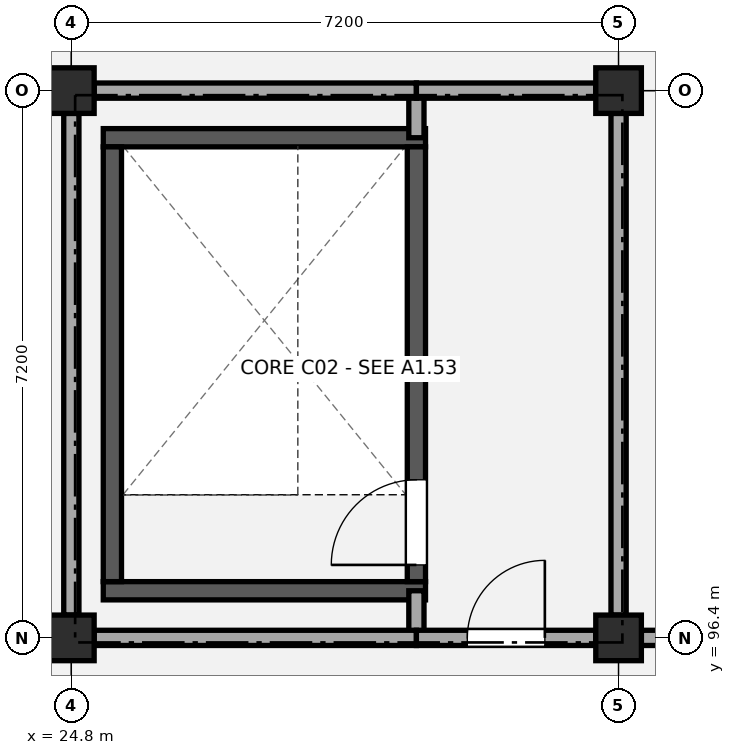
"""IFC4 building model, lengths in metres.
Left out: names, types, materials, properties, quantities, classifications, styles, units other than length and angle.
Written with IfcOpenShell. Run it as: python <this file> out.ifc"""

import sys

from ifc_helpers import new_model, si_unit, direction, frame, frame_2d, origin, origin_2d, place, context, subcontext, project, spatial, rectangle, extrude, element, fill, save


model = new_model("IFC4")
c1 = context("Model", 3, precision=1e-05, world=origin(), true_north=direction((0.0, 1.0)))
c2 = subcontext(c1, "Body", "Model", "MODEL_VIEW")
j1 = project(units=[si_unit("LENGTHUNIT", "METRE"), si_unit("PLANEANGLEUNIT", "RADIAN")], contexts=[c1])
p1 = place(None, origin())
s1 = spatial("IfcSite", under=j1, at=p1, CompositionType="ELEMENT")
p2 = place(p1, origin())
s2 = spatial("IfcBuilding", under=s1, at=p2, CompositionType="ELEMENT")
p3 = place(p2, frame((0.0, 0.0, 9.18)))
s3 = spatial("IfcBuildingStorey", under=s2, at=p3, CompositionType="ELEMENT", Elevation=9.18)
for number, where, z_axis, x_axis in (
    (1, (24.8, 96.4, 0.0), (0.0, 0.0, 1.0), (1.0, 0.0, 0.0)),
    (2, (24.8, 103.6, 0.0), (0.0, 0.0, 1.0), (1.0, 0.0, 0.0)),
    (3, (32.0, 96.4, 0.0), (0.0, 0.0, 1.0), (1.0, 0.0, 0.0)),
    (4, (32.0, 103.6, 0.0), (0.0, 0.0, 1.0), (1.0, 0.0, 0.0)),
):
    element("IfcColumn", number, at=place(p3, frame(where, z_axis=z_axis, x_axis=x_axis)), inside=s3, PredefinedType="COLUMN", context=c2, shape_type="SweptSolid", body=[
        extrude(rectangle(XDim=0.6, YDim=0.6, at=origin_2d()), origin(), (0.0, 0.0, 1.0), 4.32),
    ])
for number, where, z_axis, x_axis in (
    (5, (25.22, 97.02, 0.0), (0.0, 0.0, 1.0), (1.0, 0.0, 0.0)),
    (6, (25.22, 102.98, 0.0), (0.0, 0.0, 1.0), (1.0, 0.0, 0.0)),
):
    element("IfcWall", number, at=place(p3, frame(where, z_axis=z_axis, x_axis=x_axis)), inside=s3, PredefinedType="SHEAR", context=c2, shape_type="SweptSolid", body=[
        extrude(rectangle(XDim=4.24, YDim=0.24, at=frame_2d((2.12, 0.0))), origin(), (0.0, 0.0, 1.0), 4.04),
    ])
p4 = place(p3, frame((25.34, 97.14, 0.0), z_axis=(0.0, 0.0, 1.0), x_axis=(0.0, 1.0, 0.0)))
e7 = element("IfcWall", 7, at=p4, inside=s3, PredefinedType="SHEAR", context=c2, shape_type="SweptSolid", body=[
    extrude(rectangle(XDim=5.72, YDim=0.24, at=frame_2d((2.86, 0.0))), origin(), (0.0, 0.0, 1.0), 4.04),
])
p5 = place(p3, frame((29.34, 97.14, 0.0), z_axis=(0.0, 0.0, 1.0), x_axis=(0.0, 1.0, 0.0)))
e8 = element("IfcWall", 8, at=p5, inside=s3, PredefinedType="SHEAR", context=c2, shape_type="SweptSolid", body=[
    extrude(rectangle(XDim=5.72, YDim=0.24, at=frame_2d((2.86, 0.0))), origin(), (0.0, 0.0, 1.0), 4.04),
])
p6 = place(p5, frame((0.22, 0.0, 0.0)))
e9 = element("IfcOpeningElement", 9, at=p6, cuts=e8, PredefinedType="OPENING", context=c2, shape_type="SweptSolid", body=[
    extrude(rectangle(XDim=1.12, YDim=2.15, at=frame_2d((0.56, 1.075))), frame((0.0, 0.13, 0.0), z_axis=(0.0, -1.0, 0.0), x_axis=(1.0, 0.0, 0.0)), (0.0, 0.0, 1.0), 0.26),
])
p7 = place(p3, frame((29.34, 96.4, 0.0), z_axis=(0.0, 0.0, 1.0), x_axis=(0.0, 1.0, 0.0)))
e10 = element("IfcWall", 10, at=p7, inside=s3, PredefinedType="PARTITIONING", context=c2, shape_type="SweptSolid", body=[
    extrude(rectangle(XDim=0.62, YDim=0.2, at=frame_2d((0.31, 0.0))), origin(), (0.0, 0.0, 1.0), 3.38),
])
p8 = place(p3, frame((29.34, 102.98, 0.0), z_axis=(0.0, 0.0, 1.0), x_axis=(0.0, 1.0, 0.0)))
e11 = element("IfcWall", 11, at=p8, inside=s3, PredefinedType="PARTITIONING", context=c2, shape_type="SweptSolid", body=[
    extrude(rectangle(XDim=0.62, YDim=0.2, at=frame_2d((0.31, 0.0))), origin(), (0.0, 0.0, 1.0), 3.43),
])
for number, where, z_axis, x_axis in (
    (12, (24.8, 96.7, 0.0), (0.0, 0.0, 1.0), (0.0, 1.0, 0.0)),
    (13, (32.0, 96.7, 0.0), (0.0, 0.0, 1.0), (0.0, 1.0, 0.0)),
):
    element("IfcWall", number, at=place(p3, frame(where, z_axis=z_axis, x_axis=x_axis)), inside=s3, PredefinedType="PARTITIONING", context=c2, shape_type="SweptSolid", body=[
        extrude(rectangle(XDim=6.6, YDim=0.2, at=frame_2d((3.3, 0.0))), origin(), (0.0, 0.0, 1.0), 3.43),
    ])
p9 = place(p3, frame((25.1, 96.4, 0.0), z_axis=(0.0, 0.0, 1.0), x_axis=(1.0, 0.0, 0.0)))
e14 = element("IfcWall", 14, at=p9, inside=s3, PredefinedType="PARTITIONING", context=c2, shape_type="SweptSolid", body=[
    extrude(rectangle(XDim=4.24, YDim=0.2, at=frame_2d((2.12, 0.0))), origin(), (0.0, 0.0, 1.0), 3.38),
])
p10 = place(p3, frame((29.34, 96.4, 0.0), z_axis=(0.0, 0.0, 1.0), x_axis=(1.0, 0.0, 0.0)))
e15 = element("IfcWall", 15, at=p10, inside=s3, PredefinedType="PARTITIONING", context=c2, shape_type="SweptSolid", body=[
    extrude(rectangle(XDim=2.36, YDim=0.2, at=frame_2d((1.18, 0.0))), origin(), (0.0, 0.0, 1.0), 3.38),
])
p11 = place(p10, frame((0.67, 0.0, 0.0)))
e16 = element("IfcOpeningElement", 16, at=p11, cuts=e15, PredefinedType="OPENING", context=c2, shape_type="SweptSolid", body=[
    extrude(rectangle(XDim=1.02, YDim=2.15, at=frame_2d((0.51, 1.075))), frame((0.0, 0.11, 0.0), z_axis=(0.0, -1.0, 0.0), x_axis=(1.0, 0.0, 0.0)), (0.0, 0.0, 1.0), 0.22),
])
p12 = place(p3, frame((25.1, 103.6, 0.0), z_axis=(0.0, 0.0, 1.0), x_axis=(1.0, 0.0, 0.0)))
e17 = element("IfcWall", 17, at=p12, inside=s3, PredefinedType="PARTITIONING", context=c2, shape_type="SweptSolid", body=[
    extrude(rectangle(XDim=4.24, YDim=0.2, at=frame_2d((2.12, 0.0))), origin(), (0.0, 0.0, 1.0), 3.43),
])
p13 = place(p3, frame((29.34, 103.6, 0.0), z_axis=(0.0, 0.0, 1.0), x_axis=(1.0, 0.0, 0.0)))
e18 = element("IfcWall", 18, at=p13, inside=s3, PredefinedType="PARTITIONING", context=c2, shape_type="SweptSolid", body=[
    extrude(rectangle(XDim=2.36, YDim=0.2, at=frame_2d((1.18, 0.0))), origin(), (0.0, 0.0, 1.0), 3.43),
])
p14 = place(p3, frame((32.3, 96.4, 0.0), z_axis=(0.0, 0.0, 1.0), x_axis=(1.0, 0.0, 0.0)))
e19 = element("IfcWall", 19, at=p14, inside=s3, PredefinedType="PARTITIONING", context=c2, shape_type="SweptSolid", body=[
    extrude(rectangle(XDim=6.6, YDim=0.2, at=frame_2d((3.3, 0.0))), origin(), (0.0, 0.0, 1.0), 3.43),
])
p15 = place(p6, origin())
e20 = element("IfcDoor", 20, at=p15, inside=s3, OperationType="SINGLE_SWING_LEFT", PredefinedType="DOOR", context=c2, shape_type="SweptSolid", body=[
    extrude(rectangle(XDim=1.12, YDim=2.15, at=frame_2d((0.56, 1.075))), frame((0.0, 0.025, 0.0), z_axis=(0.0, -1.0, 0.0), x_axis=(1.0, 0.0, 0.0)), (0.0, 0.0, 1.0), 0.05),
])
fill(e9, e20)
p16 = place(p11, origin())
e21 = element("IfcDoor", 21, at=p16, inside=s3, OperationType="SINGLE_SWING_RIGHT", PredefinedType="DOOR", context=c2, shape_type="SweptSolid", body=[
    extrude(rectangle(XDim=1.02, YDim=2.15, at=frame_2d((0.51, 1.075))), frame((0.0, 0.025, 0.0), z_axis=(0.0, -1.0, 0.0), x_axis=(1.0, 0.0, 0.0)), (0.0, 0.0, 1.0), 0.05),
])
fill(e16, e21)
save(model, sys.argv[1])
